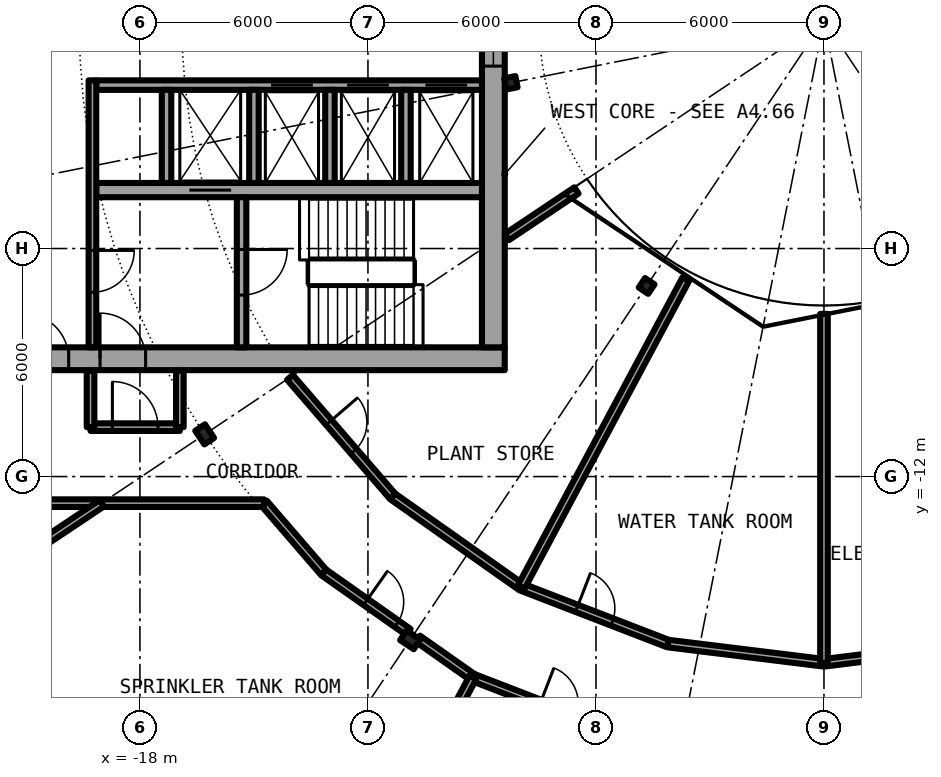
"""IFC4 building model, lengths in metres.
Left out: names, types, materials, properties, quantities, classifications, styles, units other than length and angle.
Written with IfcOpenShell. Run it as: python <this file> out.ifc"""

import sys

from ifc_helpers import new_model, si_unit, direction, frame, frame_2d, origin, origin_2d, place, context, subcontext, project, spatial, rectangle, i_section, extrude, element, fill, save


model = new_model("IFC4")
c1 = context("Model", 3, precision=1e-05, world=origin(), true_north=direction((0.0, 1.0)))
c2 = subcontext(c1, "Body", "Model", "MODEL_VIEW")
j1 = project(units=[si_unit("LENGTHUNIT", "METRE"), si_unit("PLANEANGLEUNIT", "RADIAN")], contexts=[c1])
p1 = place(None, origin())
s1 = spatial("IfcSite", under=j1, at=p1, CompositionType="ELEMENT")
p2 = place(p1, origin())
s2 = spatial("IfcBuilding", under=s1, at=p2, CompositionType="ELEMENT")
p3 = place(p2, frame((0.0, 0.0, 103.25)))
s3 = spatial("IfcBuildingStorey", under=s2, at=p3, CompositionType="ELEMENT", Elevation=103.25)
for number, where, z_axis, x_axis in (
    (1, (-16.297, -10.889, 0.0), (0.0, 0.0, 1.0), (-0.831, -0.556, 0.0)),
    (2, (-10.889, -16.297, 0.0), (0.0, 0.0, 1.0), (-0.556, -0.831, 0.0)),
):
    element("IfcColumn", number, at=place(p3, frame(where, z_axis=z_axis, x_axis=x_axis)), inside=s3, PredefinedType="COLUMN", context=c2, shape_type="SweptSolid", body=[
        extrude(i_section(OverallWidth=0.307, OverallDepth=0.432, WebThickness=0.021, FlangeThickness=0.04, FilletRadius=0.027, at=origin_2d()), origin(), (0.0, 0.0, 1.0), 4.2),
    ])
for number, where, z_axis, x_axis in (
    (3, (-8.239, -1.639, 0.0), (0.0, 0.0, 1.0), (-0.981, -0.195, 0.0)),
    (4, (-4.667, -6.984, 0.0), (0.0, 0.0, 1.0), (-0.556, -0.831, 0.0)),
):
    element("IfcColumn", number, at=place(p3, frame(where, z_axis=z_axis, x_axis=x_axis)), inside=s3, PredefinedType="COLUMN", context=c2, shape_type="SweptSolid", body=[
        extrude(i_section(OverallWidth=0.3, OverallDepth=0.3, WebThickness=0.011, FlangeThickness=0.019, FilletRadius=0.027, at=origin_2d()), origin(), (0.0, 0.0, 1.0), 4.2),
    ])
p4 = place(p3, frame((-23.967, -16.014, 0.0), z_axis=(0.0, 0.0, 1.0), x_axis=(0.634403999748, -0.773001659186, 0.0)))
e5 = element("IfcWall", 5, at=p4, inside=s3, PredefinedType="SOLIDWALL", context=c2, shape_type="SweptSolid", body=[
    extrude(rectangle(XDim=5.651, YDim=0.25, at=frame_2d((2.825, 0.0))), origin(), (0.0, 0.0, 1.0), 3.85),
])
p5 = place(p3, frame((-22.2, -8.9, 0.0), z_axis=(0.0, 0.0, 1.0), x_axis=(1.0, 0.0, 0.0)))
e6 = element("IfcWall", 6, at=p5, inside=s3, PredefinedType="SHEAR", context=c2, shape_type="SweptSolid", body=[
    extrude(rectangle(XDim=13.8, YDim=0.6, at=frame_2d((6.9, 0.0))), origin(), (0.0, 0.0, 1.0), 4.2),
])
p6 = place(p5, frame((1.125, 0.0, 0.0)))
e7 = element("IfcOpeningElement", 7, at=p6, cuts=e6, PredefinedType="OPENING", context=c2, shape_type="SweptSolid", body=[
    extrude(rectangle(XDim=1.2, YDim=2.3, at=frame_2d((0.6, 1.15))), frame((0.0, 0.31, 0.0), z_axis=(0.0, -1.0, 0.0), x_axis=(1.0, 0.0, 0.0)), (0.0, 0.0, 1.0), 0.62),
])
p7 = place(p5, frame((3.15, 0.0, 0.0)))
e8 = element("IfcOpeningElement", 8, at=p7, cuts=e6, PredefinedType="OPENING", context=c2, shape_type="SweptSolid", body=[
    extrude(rectangle(XDim=1.2, YDim=2.3, at=frame_2d((0.6, 1.15))), frame((0.0, 0.31, 0.0), z_axis=(0.0, -1.0, 0.0), x_axis=(1.0, 0.0, 0.0)), (0.0, 0.0, 1.0), 0.62),
])
p8 = place(p3, frame((-8.7, 8.6, 0.0), z_axis=(0.0, 0.0, 1.0), x_axis=(0.0, -1.0, 0.0)))
e9 = element("IfcWall", 9, at=p8, inside=s3, PredefinedType="SHEAR", context=c2, shape_type="SweptSolid", body=[
    extrude(rectangle(XDim=17.2, YDim=0.6, at=frame_2d((8.6, 0.0))), origin(), (0.0, 0.0, 1.0), 4.2),
])
p9 = place(p8, frame((7.4, 0.0, 0.1)))
e10 = element("IfcOpeningElement", 10, at=p9, cuts=e9, PredefinedType="OPENING", context=c2, shape_type="SweptSolid", body=[
    extrude(rectangle(XDim=2.4, YDim=2.2, at=frame_2d((1.2, 1.1))), frame((0.0, 0.31, 0.0), z_axis=(0.0, -1.0, 0.0), x_axis=(1.0, 0.0, 0.0)), (0.0, 0.0, 1.0), 0.62),
])
p10 = place(p3, frame((-9.0, -1.7, 0.0), z_axis=(0.0, 0.0, 1.0), x_axis=(-1.0, 0.0, 0.0)))
e11 = element("IfcWall", 11, at=p10, inside=s3, PredefinedType="SHEAR", context=c2, shape_type="SweptSolid", body=[
    extrude(rectangle(XDim=10.15, YDim=0.25, at=frame_2d((5.075, 0.0))), origin(), (0.0, 0.0, 1.0), 4.2),
])
p11 = place(p10, frame((0.387, 0.0, 0.0)))
e12 = element("IfcOpeningElement", 12, at=p11, cuts=e11, PredefinedType="OPENING", context=c2, shape_type="SweptSolid", body=[
    extrude(rectangle(XDim=1.1, YDim=2.3, at=frame_2d((0.55, 1.15))), frame((0.0, 0.135, 0.0), z_axis=(0.0, -1.0, 0.0), x_axis=(1.0, 0.0, 0.0)), (0.0, 0.0, 1.0), 0.27),
])
p12 = place(p10, frame((2.45, 0.0, 0.0)))
e13 = element("IfcOpeningElement", 13, at=p12, cuts=e11, PredefinedType="OPENING", context=c2, shape_type="SweptSolid", body=[
    extrude(rectangle(XDim=1.1, YDim=2.3, at=frame_2d((0.55, 1.15))), frame((0.0, 0.135, 0.0), z_axis=(0.0, -1.0, 0.0), x_axis=(1.0, 0.0, 0.0)), (0.0, 0.0, 1.0), 0.27),
])
p13 = place(p10, frame((4.45, 0.0, 0.0)))
e14 = element("IfcOpeningElement", 14, at=p13, cuts=e11, PredefinedType="OPENING", context=c2, shape_type="SweptSolid", body=[
    extrude(rectangle(XDim=1.1, YDim=2.3, at=frame_2d((0.55, 1.15))), frame((0.0, 0.135, 0.0), z_axis=(0.0, -1.0, 0.0), x_axis=(1.0, 0.0, 0.0)), (0.0, 0.0, 1.0), 0.27),
])
p14 = place(p3, frame((-9.0, -4.462, 0.0), z_axis=(0.0, 0.0, 1.0), x_axis=(-1.0, 0.0, 0.0)))
e15 = element("IfcWall", 15, at=p14, inside=s3, PredefinedType="SHEAR", context=c2, shape_type="SweptSolid", body=[
    extrude(rectangle(XDim=10.15, YDim=0.375, at=frame_2d((5.075, 0.0))), origin(), (0.0, 0.0, 1.0), 4.2),
])
p15 = place(p14, frame((6.6, 0.0, 0.0)))
e16 = element("IfcOpeningElement", 16, at=p15, cuts=e15, PredefinedType="OPENING", context=c2, shape_type="SweptSolid", body=[
    extrude(rectangle(XDim=1.1, YDim=2.3, at=frame_2d((0.55, 1.15))), frame((0.0, 0.198, 0.0), z_axis=(0.0, -1.0, 0.0), x_axis=(1.0, 0.0, 0.0)), (0.0, 0.0, 1.0), 0.395),
])
p16 = place(p3, frame((-15.325, -4.65, 0.0), z_axis=(0.0, 0.0, 1.0), x_axis=(0.0, -1.0, 0.0)))
e17 = element("IfcWall", 17, at=p16, inside=s3, PredefinedType="SHEAR", context=c2, shape_type="SweptSolid", body=[
    extrude(rectangle(XDim=3.95, YDim=0.25, at=frame_2d((1.975, 0.0))), origin(), (0.0, 0.0, 1.0), 4.2),
])
p17 = place(p16, frame((1.375, 0.0, 0.0)))
e18 = element("IfcOpeningElement", 18, at=p17, cuts=e17, PredefinedType="OPENING", context=c2, shape_type="SweptSolid", body=[
    extrude(rectangle(XDim=1.2, YDim=2.3, at=frame_2d((0.6, 1.15))), frame((0.0, 0.135, 0.0), z_axis=(0.0, -1.0, 0.0), x_axis=(1.0, 0.0, 0.0)), (0.0, 0.0, 1.0), 0.27),
])
for number, where, z_axis, x_axis in (
    (19, (-15.0, -1.825, 0.0), (0.0, 0.0, 1.0), (0.0, -1.0, 0.0)),
    (20, (-17.3, -1.825, 0.0), (0.0, 0.0, 1.0), (0.0, -1.0, 0.0)),
):
    element("IfcWall", number, at=place(p3, frame(where, z_axis=z_axis, x_axis=x_axis)), inside=s3, PredefinedType="SOLIDWALL", context=c2, shape_type="SweptSolid", body=[
        extrude(rectangle(XDim=2.45, YDim=0.25, at=frame_2d((1.225, 0.0))), origin(), (0.0, 0.0, 1.0), 3.85),
    ])
p18 = place(p3, frame((-19.25, -1.575, 0.0), z_axis=(0.0, 0.0, 1.0), x_axis=(0.0, -1.0, 0.0)))
e21 = element("IfcWall", 21, at=p18, inside=s3, PredefinedType="SOLIDWALL", context=c2, shape_type="SweptSolid", body=[
    extrude(rectangle(XDim=7.025, YDim=0.2, at=frame_2d((3.513, 0.0))), origin(), (0.0, 0.0, 1.0), 3.85),
])
p19 = place(p18, frame((4.475, 0.0, 0.0)))
e22 = element("IfcOpeningElement", 22, at=p19, cuts=e21, PredefinedType="OPENING", context=c2, shape_type="SweptSolid", body=[
    extrude(rectangle(XDim=1.1, YDim=2.3, at=frame_2d((0.55, 1.15))), frame((0.0, 0.11, 0.0), z_axis=(0.0, -1.0, 0.0), x_axis=(1.0, 0.0, 0.0)), (0.0, 0.0, 1.0), 0.22),
])
for number, where, z_axis, x_axis in (
    (23, (-11.0, -1.825, 0.0), (0.0, 0.0, 1.0), (0.0, -1.0, 0.0)),
    (24, (-13.0, -1.825, 0.0), (0.0, 0.0, 1.0), (0.0, -1.0, 0.0)),
):
    element("IfcWall", number, at=place(p3, frame(where, z_axis=z_axis, x_axis=x_axis)), inside=s3, PredefinedType="SOLIDWALL", context=c2, shape_type="SweptSolid", body=[
        extrude(rectangle(XDim=2.45, YDim=0.25, at=frame_2d((1.225, 0.0))), origin(), (0.0, 0.0, 1.0), 3.85),
    ])
p20 = place(p3, frame((-14.735, -12.7, 0.0), z_axis=(0.0, 0.0, 1.0), x_axis=(0.653051967032, -0.757313097969, 0.0)))
e25 = element("IfcWall", 25, at=p20, inside=s3, PredefinedType="PARTITIONING", context=c2, shape_type="SweptSolid", body=[
    extrude(rectangle(XDim=2.407, YDim=0.2, at=frame_2d((1.204, 0.0))), origin(), (0.0, 0.0, 1.0), 3.85),
])
p21 = place(p3, frame((-13.163, -14.523, 0.0), z_axis=(0.0, 0.0, 1.0), x_axis=(0.817645456482, -0.575722074872, 0.0)))
e26 = element("IfcWall", 26, at=p21, inside=s3, PredefinedType="PARTITIONING", context=c2, shape_type="SweptSolid", body=[
    extrude(rectangle(XDim=2.724, YDim=0.2, at=frame_2d((1.362, 0.0))), origin(), (0.0, 0.0, 1.0), 3.54),
])
p22 = place(p21, frame((1.35, 0.0, 0.0)))
e27 = element("IfcOpeningElement", 27, at=p22, cuts=e26, PredefinedType="OPENING", context=c2, shape_type="SweptSolid", body=[
    extrude(rectangle(XDim=1.0, YDim=2.3, at=frame_2d((0.5, 1.15))), frame((0.0, 0.11, 0.0), z_axis=(0.0, -1.0, 0.0), x_axis=(1.0, 0.0, 0.0)), (0.0, 0.0, 1.0), 0.22),
])
p23 = place(p3, frame((-10.685, -16.268, 0.0), z_axis=(0.0, 0.0, 1.0), x_axis=(0.817743843048, -0.575582320052, 0.0)))
e28 = element("IfcWall", 28, at=p23, inside=s3, PredefinedType="PARTITIONING", context=c2, shape_type="SweptSolid", body=[
    extrude(rectangle(XDim=1.768, YDim=0.2, at=frame_2d((0.884, 0.0))), origin(), (0.0, 0.0, 1.0), 3.54),
])
p24 = place(p3, frame((-9.239, -17.286, 0.0), z_axis=(0.0, 0.0, 1.0), x_axis=(0.932988479706, -0.359906233255, 0.0)))
e29 = element("IfcWall", 29, at=p24, inside=s3, PredefinedType="PARTITIONING", context=c2, shape_type="SweptSolid", body=[
    extrude(rectangle(XDim=4.799, YDim=0.2, at=frame_2d((2.399, 0.0))), origin(), (0.0, 0.0, 1.0), 3.54),
])
p25 = place(p24, frame((1.899, 0.0, 0.0)))
e30 = element("IfcOpeningElement", 30, at=p25, cuts=e29, PredefinedType="OPENING", context=c2, shape_type="SweptSolid", body=[
    extrude(rectangle(XDim=1.0, YDim=2.3, at=frame_2d((0.5, 1.15))), frame((0.0, 0.11, 0.0), z_axis=(0.0, -1.0, 0.0), x_axis=(1.0, 0.0, 0.0)), (0.0, 0.0, 1.0), 0.22),
])
p26 = place(p3, frame((-14.052, -9.389, 0.0), z_axis=(0.0, 0.0, 1.0), x_axis=(0.653212695939, -0.757174467256, 0.0)))
e31 = element("IfcWall", 31, at=p26, inside=s3, PredefinedType="PARTITIONING", context=c2, shape_type="SweptSolid", body=[
    extrude(rectangle(XDim=4.138, YDim=0.2, at=frame_2d((2.069, 0.0))), origin(), (0.0, 0.0, 1.0), 3.85),
])
p27 = place(p26, frame((1.569, 0.0, 0.0)))
e32 = element("IfcOpeningElement", 32, at=p27, cuts=e31, PredefinedType="OPENING", context=c2, shape_type="SweptSolid", body=[
    extrude(rectangle(XDim=1.0, YDim=2.3, at=frame_2d((0.5, 1.15))), frame((0.0, 0.11, 0.0), z_axis=(0.0, -1.0, 0.0), x_axis=(1.0, 0.0, 0.0)), (0.0, 0.0, 1.0), 0.22),
])
p28 = place(p3, frame((-11.349, -12.522, 0.0), z_axis=(0.0, 0.0, 1.0), x_axis=(0.817567680547, -0.575832517079, 0.0)))
e33 = element("IfcWall", 33, at=p28, inside=s3, PredefinedType="PARTITIONING", context=c2, shape_type="SweptSolid", body=[
    extrude(rectangle(XDim=4.137, YDim=0.2, at=frame_2d((2.068, 0.0))), origin(), (0.0, 0.0, 1.0), 3.85),
])
p29 = place(p3, frame((-7.967, -14.904, 0.0), z_axis=(0.0, 0.0, 1.0), x_axis=(0.932943640288, -0.360022449363, 0.0)))
e34 = element("IfcWall", 34, at=p29, inside=s3, PredefinedType="PARTITIONING", context=c2, shape_type="SweptSolid", body=[
    extrude(rectangle(XDim=4.139, YDim=0.2, at=frame_2d((2.069, 0.0))), origin(), (0.0, 0.0, 1.0), 3.85),
])
p30 = place(p29, frame((1.569, 0.0, 0.0)))
e35 = element("IfcOpeningElement", 35, at=p30, cuts=e34, PredefinedType="OPENING", context=c2, shape_type="SweptSolid", body=[
    extrude(rectangle(XDim=1.0, YDim=2.3, at=frame_2d((0.5, 1.15))), frame((0.0, 0.11, 0.0), z_axis=(0.0, -1.0, 0.0), x_axis=(1.0, 0.0, 0.0)), (0.0, 0.0, 1.0), 0.22),
])
for number, where, z_axis, x_axis in (
    (36, (-4.106, -16.394, 0.0), (0.0, 0.0, 1.0), (0.992, -0.122, 0.0)),
    (37, (0.0, -16.9, 0.0), (0.0, 0.0, 1.0), (0.992, 0.122, 0.0)),
):
    element("IfcWall", number, at=place(p3, frame(where, z_axis=z_axis, x_axis=x_axis)), inside=s3, PredefinedType="PARTITIONING", context=c2, shape_type="SweptSolid", body=[
        extrude(rectangle(XDim=4.137, YDim=0.2, at=frame_2d((2.068, 0.0))), origin(), (0.0, 0.0, 1.0), 3.85),
    ])
p31 = place(p3, frame((-21.9, -12.7, 0.0), z_axis=(0.0, 0.0, 1.0), x_axis=(1.0, 0.0, 0.0)))
e38 = element("IfcWall", 38, at=p31, inside=s3, PredefinedType="PARTITIONING", context=c2, shape_type="SweptSolid", body=[
    extrude(rectangle(XDim=7.165, YDim=0.2, at=frame_2d((3.583, 0.0))), origin(), (0.0, 0.0, 1.0), 3.85),
])
p32 = place(p31, frame((0.3, 0.0, 0.0)))
e39 = element("IfcOpeningElement", 39, at=p32, cuts=e38, PredefinedType="OPENING", context=c2, shape_type="SweptSolid", body=[
    extrude(rectangle(XDim=1.0, YDim=2.3, at=frame_2d((0.5, 1.15))), frame((0.0, 0.11, 0.0), z_axis=(0.0, -1.0, 0.0), x_axis=(1.0, 0.0, 0.0)), (0.0, 0.0, 1.0), 0.22),
])
p33 = place(p3, frame((-19.3, -10.7, 0.0), z_axis=(0.0, 0.0, 1.0), x_axis=(1.0, 0.0, 0.0)))
e40 = element("IfcWall", 40, at=p33, inside=s3, PredefinedType="PARTITIONING", context=c2, shape_type="SweptSolid", body=[
    extrude(rectangle(XDim=2.35, YDim=0.2, at=frame_2d((1.175, 0.0))), origin(), (0.0, 0.0, 1.0), 3.85),
])
p34 = place(p33, frame((0.575, 0.0, 0.0)))
e41 = element("IfcOpeningElement", 41, at=p34, cuts=e40, PredefinedType="OPENING", context=c2, shape_type="SweptSolid", body=[
    extrude(rectangle(XDim=1.2, YDim=2.3, at=frame_2d((0.6, 1.15))), frame((0.0, 0.11, 0.0), z_axis=(0.0, -1.0, 0.0), x_axis=(1.0, 0.0, 0.0)), (0.0, 0.0, 1.0), 0.22),
])
p35 = place(p3, frame((-6.513, -4.472, 0.0), z_axis=(0.0, 0.0, 1.0), x_axis=(-0.831333375071, -0.555774072347, 0.0)))
e42 = element("IfcWall", 42, at=p35, inside=s3, PredefinedType="PARTITIONING", context=c2, shape_type="SweptSolid", body=[
    extrude(rectangle(XDim=2.203, YDim=0.2, at=frame_2d((1.101, 0.0))), origin(), (0.0, 0.0, 1.0), 3.85),
])
p36 = place(p3, frame((-22.592, -15.102, 0.0), z_axis=(0.0, 0.0, 1.0), x_axis=(0.831423131448, 0.555639790235, 0.0)))
e43 = element("IfcWall", 43, at=p36, inside=s3, PredefinedType="PARTITIONING", context=c2, shape_type="SweptSolid", body=[
    extrude(rectangle(XDim=4.316, YDim=0.2, at=frame_2d((2.158, 0.0))), origin(), (0.0, 0.0, 1.0), 3.85),
])
p37 = place(p3, frame((-12.81, -23.966, 0.0), z_axis=(0.0, 0.0, 1.0), x_axis=(0.471439510802, 0.881898399848, 0.0)))
e44 = element("IfcWall", 44, at=p37, inside=s3, PredefinedType="PARTITIONING", context=c2, shape_type="SweptSolid", body=[
    extrude(rectangle(XDim=7.575, YDim=0.2, at=frame_2d((3.787, 0.0))), origin(), (0.0, 0.0, 1.0), 3.85),
])
p38 = place(p3, frame((-7.966, -14.905, 0.0), z_axis=(0.0, 0.0, 1.0), x_axis=(0.471460365694, 0.881887251059, 0.0)))
e45 = element("IfcWall", 45, at=p38, inside=s3, PredefinedType="PARTITIONING", context=c2, shape_type="SweptSolid", body=[
    extrude(rectangle(XDim=9.18, YDim=0.2, at=frame_2d((4.59, 0.0))), origin(), (0.0, 0.0, 1.0), 3.85),
])
p39 = place(p3, frame((0.0, -16.9, 0.0), z_axis=(0.0, 0.0, 1.0), x_axis=(0.0, 1.0, 0.0)))
e46 = element("IfcWall", 46, at=p39, inside=s3, PredefinedType="PARTITIONING", context=c2, shape_type="SweptSolid", body=[
    extrude(rectangle(XDim=9.18, YDim=0.2, at=frame_2d((4.59, 0.0))), origin(), (0.0, 0.0, 1.0), 3.85),
])
for number, where, z_axis, x_axis in (
    (47, (-16.95, -10.7, 0.0), (0.0, 0.0, 1.0), (0.0, 1.0, 0.0)),
    (48, (-19.3, -10.7, 0.0), (0.0, 0.0, 1.0), (0.0, 1.0, 0.0)),
):
    element("IfcWall", number, at=place(p3, frame(where, z_axis=z_axis, x_axis=x_axis)), inside=s3, PredefinedType="PARTITIONING", context=c2, shape_type="SweptSolid", body=[
        extrude(rectangle(XDim=1.48, YDim=0.2, at=frame_2d((0.74, 0.0))), origin(), (0.0, 0.0, 1.0), 3.85),
    ])
p40 = place(p11, origin())
e49 = element("IfcDoor", 49, at=p40, inside=s3, OperationType="DOUBLE_DOOR_SLIDING", PredefinedType="DOOR", context=c2, shape_type="SweptSolid", body=[
    extrude(rectangle(XDim=1.1, YDim=2.3, at=frame_2d((0.55, 1.15))), frame((0.0, 0.025, 0.0), z_axis=(0.0, -1.0, 0.0), x_axis=(1.0, 0.0, 0.0)), (0.0, 0.0, 1.0), 0.05),
])
fill(e12, e49)
p41 = place(p12, origin())
e50 = element("IfcDoor", 50, at=p41, inside=s3, OperationType="DOUBLE_DOOR_SLIDING", PredefinedType="DOOR", context=c2, shape_type="SweptSolid", body=[
    extrude(rectangle(XDim=1.1, YDim=2.3, at=frame_2d((0.55, 1.15))), frame((0.0, 0.025, 0.0), z_axis=(0.0, -1.0, 0.0), x_axis=(1.0, 0.0, 0.0)), (0.0, 0.0, 1.0), 0.05),
])
fill(e13, e50)
p42 = place(p13, origin())
e51 = element("IfcDoor", 51, at=p42, inside=s3, OperationType="DOUBLE_DOOR_SLIDING", PredefinedType="DOOR", context=c2, shape_type="SweptSolid", body=[
    extrude(rectangle(XDim=1.1, YDim=2.3, at=frame_2d((0.55, 1.15))), frame((0.0, 0.025, 0.0), z_axis=(0.0, -1.0, 0.0), x_axis=(1.0, 0.0, 0.0)), (0.0, 0.0, 1.0), 0.05),
])
fill(e14, e51)
p43 = place(p15, origin())
e52 = element("IfcDoor", 52, at=p43, inside=s3, OperationType="DOUBLE_DOOR_SLIDING", PredefinedType="DOOR", context=c2, shape_type="SweptSolid", body=[
    extrude(rectangle(XDim=1.1, YDim=2.3, at=frame_2d((0.55, 1.15))), frame((0.0, 0.025, 0.0), z_axis=(0.0, -1.0, 0.0), x_axis=(1.0, 0.0, 0.0)), (0.0, 0.0, 1.0), 0.05),
])
fill(e16, e52)
p44 = place(p17, origin())
e53 = element("IfcDoor", 53, at=p44, inside=s3, OperationType="SINGLE_SWING_LEFT", PredefinedType="DOOR", context=c2, shape_type="SweptSolid", body=[
    extrude(rectangle(XDim=1.2, YDim=2.3, at=frame_2d((0.6, 1.15))), frame((0.0, 0.025, 0.0), z_axis=(0.0, -1.0, 0.0), x_axis=(1.0, 0.0, 0.0)), (0.0, 0.0, 1.0), 0.05),
])
fill(e18, e53)
p45 = place(p19, origin())
e54 = element("IfcDoor", 54, at=p45, inside=s3, OperationType="SINGLE_SWING_LEFT", PredefinedType="DOOR", context=c2, shape_type="SweptSolid", body=[
    extrude(rectangle(XDim=1.1, YDim=2.3, at=frame_2d((0.55, 1.15))), frame((0.0, 0.025, 0.0), z_axis=(0.0, -1.0, 0.0), x_axis=(1.0, 0.0, 0.0)), (0.0, 0.0, 1.0), 0.05),
])
fill(e22, e54)
p46 = place(p6, origin())
e55 = element("IfcDoor", 55, at=p46, inside=s3, OperationType="SINGLE_SWING_RIGHT", PredefinedType="DOOR", context=c2, shape_type="SweptSolid", body=[
    extrude(rectangle(XDim=1.2, YDim=2.3, at=frame_2d((0.6, 1.15))), frame((0.0, 0.025, 0.0), z_axis=(0.0, -1.0, 0.0), x_axis=(1.0, 0.0, 0.0)), (0.0, 0.0, 1.0), 0.05),
])
fill(e7, e55)
p47 = place(p7, origin())
e56 = element("IfcDoor", 56, at=p47, inside=s3, OperationType="SINGLE_SWING_RIGHT", PredefinedType="DOOR", context=c2, shape_type="SweptSolid", body=[
    extrude(rectangle(XDim=1.2, YDim=2.3, at=frame_2d((0.6, 1.15))), frame((0.0, 0.025, 0.0), z_axis=(0.0, -1.0, 0.0), x_axis=(1.0, 0.0, 0.0)), (0.0, 0.0, 1.0), 0.05),
])
fill(e8, e56)
p48 = place(p9, origin())
e57 = element("IfcWindow", 57, at=p48, inside=s3, PartitioningType="SINGLE_PANEL", PredefinedType="WINDOW", context=c2, shape_type="SweptSolid", body=[
    extrude(rectangle(XDim=2.4, YDim=2.2, at=frame_2d((1.2, 1.1))), frame((0.0, 0.03, 0.0), z_axis=(0.0, -1.0, 0.0), x_axis=(1.0, 0.0, 0.0)), (0.0, 0.0, 1.0), 0.06),
])
fill(e10, e57)
p49 = place(p34, origin())
e58 = element("IfcDoor", 58, at=p49, inside=s3, OperationType="SINGLE_SWING_LEFT", PredefinedType="DOOR", context=c2, shape_type="SweptSolid", body=[
    extrude(rectangle(XDim=1.2, YDim=2.3, at=frame_2d((0.6, 1.15))), frame((0.0, 0.025, 0.0), z_axis=(0.0, -1.0, 0.0), x_axis=(1.0, 0.0, 0.0)), (0.0, 0.0, 1.0), 0.05),
])
fill(e41, e58)
p50 = place(p22, origin())
e59 = element("IfcDoor", 59, at=p50, inside=s3, OperationType="SINGLE_SWING_RIGHT", PredefinedType="DOOR", context=c2, shape_type="SweptSolid", body=[
    extrude(rectangle(XDim=1.0, YDim=2.3, at=frame_2d((0.5, 1.15))), frame((0.0, 0.025, 0.0), z_axis=(0.0, -1.0, 0.0), x_axis=(1.0, 0.0, 0.0)), (0.0, 0.0, 1.0), 0.05),
])
fill(e27, e59)
p51 = place(p27, origin())
e60 = element("IfcDoor", 60, at=p51, inside=s3, OperationType="SINGLE_SWING_LEFT", PredefinedType="DOOR", context=c2, shape_type="SweptSolid", body=[
    extrude(rectangle(XDim=1.0, YDim=2.3, at=frame_2d((0.5, 1.15))), frame((0.0, 0.025, 0.0), z_axis=(0.0, -1.0, 0.0), x_axis=(1.0, 0.0, 0.0)), (0.0, 0.0, 1.0), 0.05),
])
fill(e32, e60)
p52 = place(p30, origin())
e61 = element("IfcDoor", 61, at=p52, inside=s3, OperationType="SINGLE_SWING_LEFT", PredefinedType="DOOR", context=c2, shape_type="SweptSolid", body=[
    extrude(rectangle(XDim=1.0, YDim=2.3, at=frame_2d((0.5, 1.15))), frame((0.0, 0.025, 0.0), z_axis=(0.0, -1.0, 0.0), x_axis=(1.0, 0.0, 0.0)), (0.0, 0.0, 1.0), 0.05),
])
fill(e35, e61)
save(model, sys.argv[1])
